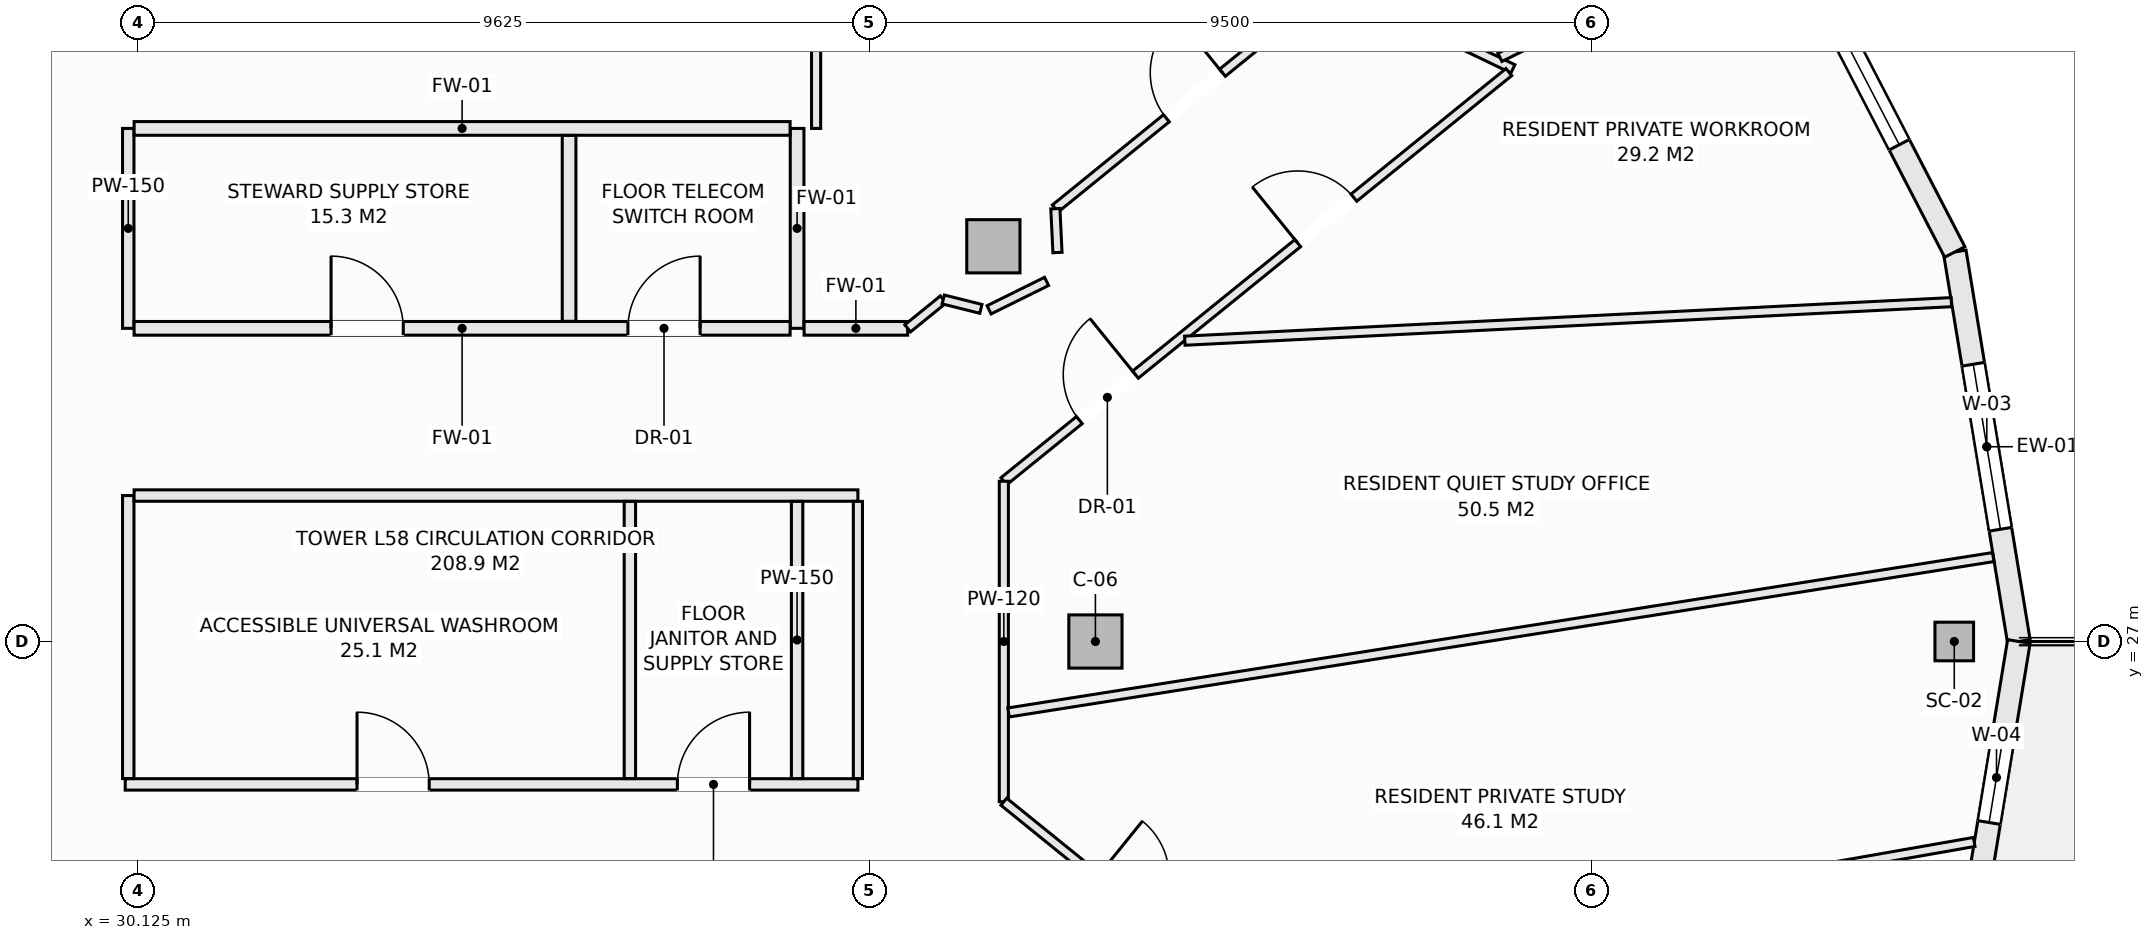
"""IFC4 building model, lengths in metres.
Left out: names, types, materials, properties, quantities, classifications, styles, units other than length and angle.
Written with IfcOpenShell. Run it as: python <this file> out.ifc"""

import sys

from ifc_helpers import new_model, si_unit, direction, frame, frame_2d, origin, origin_2d, place, context, subcontext, project, spatial, rectangle, hollow_rectangle, extrude, element, fill, save


model = new_model("IFC4")
c1 = context("Model", 3, precision=1e-05, world=origin(), true_north=direction((0.0, 1.0)))
c2 = subcontext(c1, "Body", "Model", "MODEL_VIEW")
j1 = project(units=[si_unit("LENGTHUNIT", "METRE"), si_unit("PLANEANGLEUNIT", "RADIAN")], contexts=[c1])
p1 = place(None, origin())
s1 = spatial("IfcSite", under=j1, at=p1, CompositionType="ELEMENT")
p2 = place(p1, origin())
s2 = spatial("IfcBuilding", under=s1, at=p2, CompositionType="ELEMENT")
p3 = place(p2, frame((0.0, 0.0, 219.5)))
s3 = spatial("IfcBuildingStorey", under=s2, at=p3, CompositionType="ELEMENT", Elevation=219.5)
p4 = place(p3, frame((54.025, 27.0, -0.27), z_axis=(0.0, 0.0, 1.0), x_axis=(1.0, 0.0, 0.0)))
e1 = element("IfcColumn", 1, at=p4, inside=s3, PredefinedType="COLUMN", context=c2, shape_type="SweptSolid", body=[
    extrude(hollow_rectangle(XDim=0.508, YDim=0.508, WallThickness=0.019, at=origin_2d()), origin(), (0.0, 0.0, 1.0), 3.3),
])
for number, where, z_axis, x_axis in (
    (2, (42.725, 27.0, -0.27), (0.0, 0.0, 1.0), (1.0, 0.0, 0.0)),
    (3, (41.382, 32.199, -0.27), (0.0, 0.0, 1.0), (1.0, 0.0, 0.0)),
):
    element("IfcColumn", number, at=place(p3, frame(where, z_axis=z_axis, x_axis=x_axis)), inside=s3, PredefinedType="COLUMN", context=c2, shape_type="SweptSolid", body=[
        extrude(rectangle(XDim=0.7, YDim=0.7, at=origin_2d()), origin(), (0.0, 0.0, 1.0), 3.3),
    ])
p5 = place(p3, frame((54.032, 32.125, 0.0), z_axis=(0.0, 0.0, 1.0), x_axis=(0.16237087798, -0.986729799886, 0.0)))
e4 = element("IfcWall", 4, at=p5, inside=s3, PredefinedType="SOLIDWALL", context=c2, shape_type="SweptSolid", body=[
    extrude(rectangle(XDim=5.193, YDim=0.3, at=frame_2d((2.597, 0.0))), origin(), (0.0, 0.0, 1.0), 2.605),
])
p6 = place(p5, frame((1.497, 0.0, 0.72)))
e5 = element("IfcOpeningElement", 5, at=p6, cuts=e4, PredefinedType="OPENING", context=c2, shape_type="SweptSolid", body=[
    extrude(rectangle(XDim=2.2, YDim=1.65, at=frame_2d((1.1, 0.825))), frame((0.0, 0.16, 0.0), z_axis=(0.0, -1.0, 0.0), x_axis=(1.0, 0.0, 0.0)), (0.0, 0.0, 1.0), 0.32),
])
p7 = place(p3, frame((51.559, 36.9, 0.0), z_axis=(0.0, 0.0, 1.0), x_axis=(0.459808219482, -0.888018243786, 0.0)))
e6 = element("IfcWall", 6, at=p7, inside=s3, PredefinedType="SOLIDWALL", context=c2, shape_type="SweptSolid", body=[
    extrude(rectangle(XDim=5.378, YDim=0.3, at=frame_2d((2.689, 0.0))), origin(), (0.0, 0.0, 1.0), 2.605),
])
p8 = place(p7, frame((1.589, 0.0, 0.72)))
e7 = element("IfcOpeningElement", 7, at=p8, cuts=e6, PredefinedType="OPENING", context=c2, shape_type="SweptSolid", body=[
    extrude(rectangle(XDim=2.2, YDim=1.65, at=frame_2d((1.1, 0.825))), frame((0.0, 0.16, 0.0), z_axis=(0.0, -1.0, 0.0), x_axis=(1.0, 0.0, 0.0)), (0.0, 0.0, 1.0), 0.32),
])
p9 = place(p3, frame((54.032, 21.875, 0.0), z_axis=(0.0, 0.0, 1.0), x_axis=(0.16237087798, 0.986729799886, 0.0)))
e8 = element("IfcWall", 8, at=p9, inside=s3, PredefinedType="SOLIDWALL", context=c2, shape_type="SweptSolid", body=[
    extrude(rectangle(XDim=5.193, YDim=0.3, at=frame_2d((2.597, 0.0))), origin(), (0.0, 0.0, 1.0), 2.605),
])
p10 = place(p9, frame((2.78, 0.0, 0.72)))
e9 = element("IfcOpeningElement", 9, at=p10, cuts=e8, PredefinedType="OPENING", context=c2, shape_type="SweptSolid", body=[
    extrude(rectangle(XDim=1.2, YDim=1.65, at=frame_2d((0.6, 0.825))), frame((0.0, 0.16, 0.0), z_axis=(0.0, -1.0, 0.0), x_axis=(1.0, 0.0, 0.0)), (0.0, 0.0, 1.0), 0.32),
])
p11 = place(p3, frame((29.96, 25.12, 0.0), z_axis=(0.0, 0.0, 1.0), x_axis=(1.0, 0.0, 0.0)))
e10 = element("IfcWall", 10, at=p11, inside=s3, PredefinedType="PARTITIONING", context=c2, shape_type="SweptSolid", body=[
    extrude(rectangle(XDim=9.64, YDim=0.15, at=frame_2d((4.82, 0.0))), origin(), (0.0, 0.0, 1.0), 3.03),
])
p12 = place(p11, frame((3.05, 0.0, 0.0)))
e11 = element("IfcOpeningElement", 11, at=p12, cuts=e10, PredefinedType="OPENING", context=c2, shape_type="SweptSolid", body=[
    extrude(rectangle(XDim=0.95, YDim=2.1, at=frame_2d((0.475, 1.05))), frame((0.0, 0.085, 0.0), z_axis=(0.0, -1.0, 0.0), x_axis=(1.0, 0.0, 0.0)), (0.0, 0.0, 1.0), 0.17),
])
p13 = place(p11, frame((7.265, 0.0, 0.0)))
e12 = element("IfcOpeningElement", 12, at=p13, cuts=e10, PredefinedType="OPENING", context=c2, shape_type="SweptSolid", body=[
    extrude(rectangle(XDim=0.95, YDim=2.1, at=frame_2d((0.475, 1.05))), frame((0.0, 0.085, 0.0), z_axis=(0.0, -1.0, 0.0), x_axis=(1.0, 0.0, 0.0)), (0.0, 0.0, 1.0), 0.17),
])
p14 = place(p3, frame((30.0, 25.197, 0.0), z_axis=(0.0, 0.0, 1.0), x_axis=(0.0, 1.0, 0.0)))
e13 = element("IfcWall", 13, at=p14, inside=s3, PredefinedType="PARTITIONING", context=c2, shape_type="SweptSolid", body=[
    extrude(rectangle(XDim=3.723, YDim=0.15, at=frame_2d((1.861, 0.0))), origin(), (0.0, 0.0, 1.0), 3.03),
])
p15 = place(p3, frame((30.0, 31.12, 0.0), z_axis=(0.0, 0.0, 1.0), x_axis=(0.0, 1.0, 0.0)))
e14 = element("IfcWall", 14, at=p15, inside=s3, PredefinedType="PARTITIONING", context=c2, shape_type="SweptSolid", body=[
    extrude(rectangle(XDim=2.63, YDim=0.15, at=frame_2d((1.315, 0.0))), origin(), (0.0, 0.0, 1.0), 3.03),
])
p16 = place(p3, frame((30.077, 28.92, 0.0), z_axis=(0.0, 0.0, 1.0), x_axis=(1.0, 0.0, 0.0)))
e15 = element("IfcWall", 15, at=p16, inside=s3, PredefinedType="PARTITIONING", context=c2, shape_type="SweptSolid", body=[
    extrude(rectangle(XDim=9.523, YDim=0.15, at=frame_2d((4.762, 0.0))), origin(), (0.0, 0.0, 1.0), 3.03),
])
for number, where, z_axis, x_axis in (
    (16, (36.6, 25.197, 0.0), (0.0, 0.0, 1.0), (0.0, 1.0, 0.0)),
    (17, (38.8, 25.197, 0.0), (0.0, 0.0, 1.0), (0.0, 1.0, 0.0)),
):
    element("IfcWall", number, at=place(p3, frame(where, z_axis=z_axis, x_axis=x_axis)), inside=s3, PredefinedType="PARTITIONING", context=c2, shape_type="SweptSolid", body=[
        extrude(rectangle(XDim=3.646, YDim=0.15, at=frame_2d((1.823, 0.0))), origin(), (0.0, 0.0, 1.0), 3.03),
    ])
p17 = place(p3, frame((38.8, 31.12, 0.0), z_axis=(0.0, 0.0, 1.0), x_axis=(0.0, 1.0, 0.0)))
e18 = element("IfcWall", 18, at=p17, inside=s3, PredefinedType="SOLIDWALL", context=c2, shape_type="SweptSolid", body=[
    extrude(rectangle(XDim=2.63, YDim=0.18, at=frame_2d((1.315, 0.0))), origin(), (0.0, 0.0, 1.0), 3.03),
])
p18 = place(p3, frame((30.077, 31.12, 0.0), z_axis=(0.0, 0.0, 1.0), x_axis=(1.0, 0.0, 0.0)))
e19 = element("IfcWall", 19, at=p18, inside=s3, PredefinedType="SOLIDWALL", context=c2, shape_type="SweptSolid", body=[
    extrude(rectangle(XDim=8.631, YDim=0.18, at=frame_2d((4.315, 0.0))), origin(), (0.0, 0.0, 1.0), 3.03),
])
p19 = place(p18, frame((2.592, 0.0, 0.0)))
e20 = element("IfcOpeningElement", 20, at=p19, cuts=e19, PredefinedType="OPENING", context=c2, shape_type="SweptSolid", body=[
    extrude(rectangle(XDim=0.95, YDim=2.1, at=frame_2d((0.475, 1.05))), frame((0.0, 0.1, 0.0), z_axis=(0.0, -1.0, 0.0), x_axis=(1.0, 0.0, 0.0)), (0.0, 0.0, 1.0), 0.2),
])
p20 = place(p18, frame((6.497, 0.0, 0.0)))
e21 = element("IfcOpeningElement", 21, at=p20, cuts=e19, PredefinedType="OPENING", context=c2, shape_type="SweptSolid", body=[
    extrude(rectangle(XDim=0.95, YDim=2.1, at=frame_2d((0.475, 1.05))), frame((0.0, 0.1, 0.0), z_axis=(0.0, -1.0, 0.0), x_axis=(1.0, 0.0, 0.0)), (0.0, 0.0, 1.0), 0.2),
])
p21 = place(p3, frame((38.892, 31.12, 0.0), z_axis=(0.0, 0.0, 1.0), x_axis=(1.0, 0.0, 0.0)))
e22 = element("IfcWall", 22, at=p21, inside=s3, PredefinedType="SOLIDWALL", context=c2, shape_type="SweptSolid", body=[
    extrude(rectangle(XDim=1.363, YDim=0.18, at=frame_2d((0.681, 0.0))), origin(), (0.0, 0.0, 1.0), 3.03),
])
p22 = place(p3, frame((30.077, 33.75, 0.0), z_axis=(0.0, 0.0, 1.0), x_axis=(1.0, 0.0, 0.0)))
e23 = element("IfcWall", 23, at=p22, inside=s3, PredefinedType="SOLIDWALL", context=c2, shape_type="SweptSolid", body=[
    extrude(rectangle(XDim=8.631, YDim=0.18, at=frame_2d((4.315, 0.0))), origin(), (0.0, 0.0, 1.0), 3.03),
])
p23 = place(p3, frame((35.8, 31.212, 0.0), z_axis=(0.0, 0.0, 1.0), x_axis=(0.0, 1.0, 0.0)))
e24 = element("IfcWall", 24, at=p23, inside=s3, PredefinedType="SOLIDWALL", context=c2, shape_type="SweptSolid", body=[
    extrude(rectangle(XDim=2.446, YDim=0.18, at=frame_2d((1.223, 0.0))), origin(), (0.0, 0.0, 1.0), 3.03),
])
p24 = place(p3, frame((39.05, 33.75, 0.0), z_axis=(0.0, 0.0, 1.0), x_axis=(0.0, 1.0, 0.0)))
e25 = element("IfcWall", 25, at=p24, inside=s3, PredefinedType="PARTITIONING", context=c2, shape_type="SweptSolid", body=[
    extrude(rectangle(XDim=1.938, YDim=0.12, at=frame_2d((0.969, 0.0))), origin(), (0.0, 0.0, 1.0), 3.03),
])
p25 = place(p3, frame((40.255, 31.12, 0.0), z_axis=(0.0, 0.0, 1.0), x_axis=(0.776423627794, 0.630211353598, 0.0)))
e26 = element("IfcWall", 26, at=p25, inside=s3, PredefinedType="PARTITIONING", context=c2, shape_type="SweptSolid", body=[
    extrude(rectangle(XDim=0.603, YDim=0.12, at=frame_2d((0.301, 0.0))), origin(), (0.0, 0.0, 1.0), 3.03),
])
p26 = place(p3, frame((42.196, 32.696, 0.0), z_axis=(0.0, 0.0, 1.0), x_axis=(0.776319732197, 0.630339331949, 0.0)))
e27 = element("IfcWall", 27, at=p26, inside=s3, PredefinedType="PARTITIONING", context=c2, shape_type="SweptSolid", body=[
    extrude(rectangle(XDim=4.718, YDim=0.12, at=frame_2d((2.359, 0.0))), origin(), (0.0, 0.0, 1.0), 2.77),
])
p27 = place(p26, frame((1.884, 0.0, 0.0)))
e28 = element("IfcOpeningElement", 28, at=p27, cuts=e27, PredefinedType="OPENING", context=c2, shape_type="SweptSolid", body=[
    extrude(rectangle(XDim=0.95, YDim=2.1, at=frame_2d((0.475, 1.05))), frame((0.0, 0.07, 0.0), z_axis=(0.0, -1.0, 0.0), x_axis=(1.0, 0.0, 0.0)), (0.0, 0.0, 1.0), 0.14),
])
p28 = place(p3, frame((40.723, 31.5, 0.0), z_axis=(0.0, 0.0, 1.0), x_axis=(0.970029850173, -0.24298578101, 0.0)))
e29 = element("IfcWall", 29, at=p28, inside=s3, PredefinedType="PARTITIONING", context=c2, shape_type="SweptSolid", body=[
    extrude(rectangle(XDim=0.51, YDim=0.12, at=frame_2d((0.255, 0.0))), origin(), (0.0, 0.0, 1.0), 3.03),
])
p29 = place(p3, frame((42.198, 32.694, 0.0), z_axis=(0.0, 0.0, 1.0), x_axis=(0.048629948931, -0.998816864128, 0.0)))
e30 = element("IfcWall", 30, at=p29, inside=s3, PredefinedType="PARTITIONING", context=c2, shape_type="SweptSolid", body=[
    extrude(rectangle(XDim=0.577, YDim=0.12, at=frame_2d((0.289, 0.0))), origin(), (0.0, 0.0, 1.0), 3.03),
])
p30 = place(p3, frame((45.864, 35.664, 0.0), z_axis=(0.0, 0.0, 1.0), x_axis=(0.901492416592, -0.432794896951, 0.0)))
e31 = element("IfcWall", 31, at=p30, inside=s3, PredefinedType="PARTITIONING", context=c2, shape_type="SweptSolid", body=[
    extrude(rectangle(XDim=2.611, YDim=0.12, at=frame_2d((1.306, 0.0))), origin(), (0.0, 0.0, 1.0), 3.03),
])
p31 = place(p3, frame((41.52, 29.108, 0.0), z_axis=(0.0, 0.0, 1.0), x_axis=(0.777032738693, 0.629460183808, 0.0)))
e32 = element("IfcWall", 32, at=p31, inside=s3, PredefinedType="PARTITIONING", context=c2, shape_type="SweptSolid", body=[
    extrude(rectangle(XDim=8.552, YDim=0.12, at=frame_2d((4.276, 0.0))), origin(), (0.0, 0.0, 1.0), 3.03),
])
p32 = place(p31, frame((1.278, 0.0, 0.0)))
e33 = element("IfcOpeningElement", 33, at=p32, cuts=e32, PredefinedType="OPENING", context=c2, shape_type="SweptSolid", body=[
    extrude(rectangle(XDim=0.95, YDim=2.1, at=frame_2d((0.475, 1.05))), frame((0.0, 0.07, 0.0), z_axis=(0.0, -1.0, 0.0), x_axis=(1.0, 0.0, 0.0)), (0.0, 0.0, 1.0), 0.14),
])
p33 = place(p31, frame((4.977, 0.0, 0.0)))
e34 = element("IfcOpeningElement", 34, at=p33, cuts=e32, PredefinedType="OPENING", context=c2, shape_type="SweptSolid", body=[
    extrude(rectangle(XDim=0.95, YDim=2.1, at=frame_2d((0.475, 1.05))), frame((0.0, 0.07, 0.0), z_axis=(0.0, -1.0, 0.0), x_axis=(1.0, 0.0, 0.0)), (0.0, 0.0, 1.0), 0.14),
])
p34 = place(p3, frame((41.52, 24.892, 0.0), z_axis=(0.0, 0.0, 1.0), x_axis=(0.0, 1.0, 0.0)))
e35 = element("IfcWall", 35, at=p34, inside=s3, PredefinedType="PARTITIONING", context=c2, shape_type="SweptSolid", body=[
    extrude(rectangle(XDim=4.216, YDim=0.12, at=frame_2d((2.108, 0.0))), origin(), (0.0, 0.0, 1.0), 3.03),
])
p35 = place(p3, frame((41.52, 24.892, 0.0), z_axis=(0.0, 0.0, 1.0), x_axis=(0.777027167904, -0.629467060567, 0.0)))
e36 = element("IfcWall", 36, at=p35, inside=s3, PredefinedType="PARTITIONING", context=c2, shape_type="SweptSolid", body=[
    extrude(rectangle(XDim=8.62, YDim=0.12, at=frame_2d((4.31, 0.0))), origin(), (0.0, 0.0, 1.0), 2.77),
])
p36 = place(p35, frame((5.4, 0.0, 0.0)))
e37 = element("IfcOpeningElement", 37, at=p36, cuts=e36, PredefinedType="OPENING", context=c2, shape_type="SweptSolid", body=[
    extrude(rectangle(XDim=0.95, YDim=2.1, at=frame_2d((0.475, 1.05))), frame((0.0, 0.07, 0.0), z_axis=(0.0, -1.0, 0.0), x_axis=(1.0, 0.0, 0.0)), (0.0, 0.0, 1.0), 0.14),
])
p37 = place(p35, frame((1.578, 0.0, 0.0)))
e38 = element("IfcOpeningElement", 38, at=p37, cuts=e36, PredefinedType="OPENING", context=c2, shape_type="SweptSolid", body=[
    extrude(rectangle(XDim=0.95, YDim=2.1, at=frame_2d((0.475, 1.05))), frame((0.0, 0.07, 0.0), z_axis=(0.0, -1.0, 0.0), x_axis=(1.0, 0.0, 0.0)), (0.0, 0.0, 1.0), 0.14),
])
p38 = place(p3, frame((39.6, 25.197, 0.0), z_axis=(0.0, 0.0, 1.0), x_axis=(0.0, 1.0, 0.0)))
e39 = element("IfcWall", 39, at=p38, inside=s3, PredefinedType="PARTITIONING", context=c2, shape_type="SweptSolid", body=[
    extrude(rectangle(XDim=3.646, YDim=0.12, at=frame_2d((1.823, 0.0))), origin(), (0.0, 0.0, 1.0), 3.03),
])
p39 = place(p3, frame((41.582, 26.066, 0.0), z_axis=(0.0, 0.0, 1.0), x_axis=(0.987780616659, 0.155850740621, 0.0)))
e40 = element("IfcWall", 40, at=p39, inside=s3, PredefinedType="PARTITIONING", context=c2, shape_type="SweptSolid", body=[
    extrude(rectangle(XDim=13.116, YDim=0.12, at=frame_2d((6.558, 0.0))), origin(), (0.0, 0.0, 1.0), 2.478),
])
p40 = place(p3, frame((44.412, 22.629, 0.0), z_axis=(0.0, 0.0, 1.0), x_axis=(0.984937605234, 0.172910132136, 0.0)))
e41 = element("IfcWall", 41, at=p40, inside=s3, PredefinedType="PARTITIONING", context=c2, shape_type="SweptSolid", body=[
    extrude(rectangle(XDim=10.026, YDim=0.12, at=frame_2d((5.013, 0.0))), origin(), (0.0, 0.0, 1.0), 2.77),
])
p41 = place(p3, frame((43.901, 30.957, 0.0), z_axis=(0.0, 0.0, 1.0), x_axis=(0.998738311517, 0.050217378547, 0.0)))
e42 = element("IfcWall", 42, at=p41, inside=s3, PredefinedType="PARTITIONING", context=c2, shape_type="SweptSolid", body=[
    extrude(rectangle(XDim=10.098, YDim=0.12, at=frame_2d((5.049, 0.0))), origin(), (0.0, 0.0, 1.0), 3.03),
])
p42 = place(p3, frame((41.326, 31.364, 0.0), z_axis=(0.0, 0.0, 1.0), x_axis=(0.896444200568, 0.443156626112, 0.0)))
e43 = element("IfcWall", 43, at=p42, inside=s3, PredefinedType="PARTITIONING", context=c2, shape_type="SweptSolid", body=[
    extrude(rectangle(XDim=0.844, YDim=0.12, at=frame_2d((0.422, 0.0))), origin(), (0.0, 0.0, 1.0), 3.03),
])
p43 = place(p3, frame((48.047, 34.685, 0.0), z_axis=(0.0, 0.0, 1.0), x_axis=(0.896512119569, 0.443019208912, 0.0)))
e44 = element("IfcWall", 44, at=p43, inside=s3, PredefinedType="PARTITIONING", context=c2, shape_type="SweptSolid", body=[
    extrude(rectangle(XDim=3.986, YDim=0.12, at=frame_2d((1.993, 0.0))), origin(), (0.0, 0.0, 1.0), 3.03),
])
p44 = place(p6, origin())
e45 = element("IfcWindow", 45, at=p44, inside=s3, PartitioningType="SINGLE_PANEL", PredefinedType="WINDOW", context=c2, shape_type="SweptSolid", body=[
    extrude(rectangle(XDim=2.2, YDim=1.65, at=frame_2d((1.1, 0.825))), frame((0.0, 0.03, 0.0), z_axis=(0.0, -1.0, 0.0), x_axis=(1.0, 0.0, 0.0)), (0.0, 0.0, 1.0), 0.06),
])
fill(e5, e45)
p45 = place(p8, origin())
e46 = element("IfcWindow", 46, at=p45, inside=s3, PartitioningType="SINGLE_PANEL", PredefinedType="WINDOW", context=c2, shape_type="SweptSolid", body=[
    extrude(rectangle(XDim=2.2, YDim=1.65, at=frame_2d((1.1, 0.825))), frame((0.0, 0.03, 0.0), z_axis=(0.0, -1.0, 0.0), x_axis=(1.0, 0.0, 0.0)), (0.0, 0.0, 1.0), 0.06),
])
fill(e7, e46)
p46 = place(p10, origin())
e47 = element("IfcWindow", 47, at=p46, inside=s3, PartitioningType="SINGLE_PANEL", PredefinedType="WINDOW", context=c2, shape_type="SweptSolid", body=[
    extrude(rectangle(XDim=1.2, YDim=1.65, at=frame_2d((0.6, 0.825))), frame((0.0, 0.03, 0.0), z_axis=(0.0, -1.0, 0.0), x_axis=(1.0, 0.0, 0.0)), (0.0, 0.0, 1.0), 0.06),
])
fill(e9, e47)
p47 = place(p12, origin())
e48 = element("IfcDoor", 48, at=p47, inside=s3, OperationType="SINGLE_SWING_LEFT", PredefinedType="DOOR", context=c2, shape_type="SweptSolid", body=[
    extrude(rectangle(XDim=0.95, YDim=2.1, at=frame_2d((0.475, 1.05))), frame((0.0, 0.025, 0.0), z_axis=(0.0, -1.0, 0.0), x_axis=(1.0, 0.0, 0.0)), (0.0, 0.0, 1.0), 0.05),
])
fill(e11, e48)
p48 = place(p13, origin())
e49 = element("IfcDoor", 49, at=p48, inside=s3, OperationType="SINGLE_SWING_RIGHT", PredefinedType="DOOR", context=c2, shape_type="SweptSolid", body=[
    extrude(rectangle(XDim=0.95, YDim=2.1, at=frame_2d((0.475, 1.05))), frame((0.0, 0.025, 0.0), z_axis=(0.0, -1.0, 0.0), x_axis=(1.0, 0.0, 0.0)), (0.0, 0.0, 1.0), 0.05),
])
fill(e12, e49)
p49 = place(p19, origin())
e50 = element("IfcDoor", 50, at=p49, inside=s3, OperationType="SINGLE_SWING_LEFT", PredefinedType="DOOR", context=c2, shape_type="SweptSolid", body=[
    extrude(rectangle(XDim=0.95, YDim=2.1, at=frame_2d((0.475, 1.05))), frame((0.0, 0.025, 0.0), z_axis=(0.0, -1.0, 0.0), x_axis=(1.0, 0.0, 0.0)), (0.0, 0.0, 1.0), 0.05),
])
fill(e20, e50)
p50 = place(p20, origin())
e51 = element("IfcDoor", 51, at=p50, inside=s3, OperationType="SINGLE_SWING_RIGHT", PredefinedType="DOOR", context=c2, shape_type="SweptSolid", body=[
    extrude(rectangle(XDim=0.95, YDim=2.1, at=frame_2d((0.475, 1.05))), frame((0.0, 0.025, 0.0), z_axis=(0.0, -1.0, 0.0), x_axis=(1.0, 0.0, 0.0)), (0.0, 0.0, 1.0), 0.05),
])
fill(e21, e51)
p51 = place(p32, origin())
e52 = element("IfcDoor", 52, at=p51, inside=s3, OperationType="SINGLE_SWING_RIGHT", PredefinedType="DOOR", context=c2, shape_type="SweptSolid", body=[
    extrude(rectangle(XDim=0.95, YDim=2.1, at=frame_2d((0.475, 1.05))), frame((0.0, 0.025, 0.0), z_axis=(0.0, -1.0, 0.0), x_axis=(1.0, 0.0, 0.0)), (0.0, 0.0, 1.0), 0.05),
])
fill(e33, e52)
p52 = place(p33, origin())
e53 = element("IfcDoor", 53, at=p52, inside=s3, OperationType="SINGLE_SWING_LEFT", PredefinedType="DOOR", context=c2, shape_type="SweptSolid", body=[
    extrude(rectangle(XDim=0.95, YDim=2.1, at=frame_2d((0.475, 1.05))), frame((0.0, 0.025, 0.0), z_axis=(0.0, -1.0, 0.0), x_axis=(1.0, 0.0, 0.0)), (0.0, 0.0, 1.0), 0.05),
])
fill(e34, e53)
p53 = place(p27, origin())
e54 = element("IfcDoor", 54, at=p53, inside=s3, OperationType="SINGLE_SWING_RIGHT", PredefinedType="DOOR", context=c2, shape_type="SweptSolid", body=[
    extrude(rectangle(XDim=0.95, YDim=2.1, at=frame_2d((0.475, 1.05))), frame((0.0, 0.025, 0.0), z_axis=(0.0, -1.0, 0.0), x_axis=(1.0, 0.0, 0.0)), (0.0, 0.0, 1.0), 0.05),
])
fill(e28, e54)
save(model, sys.argv[1])
